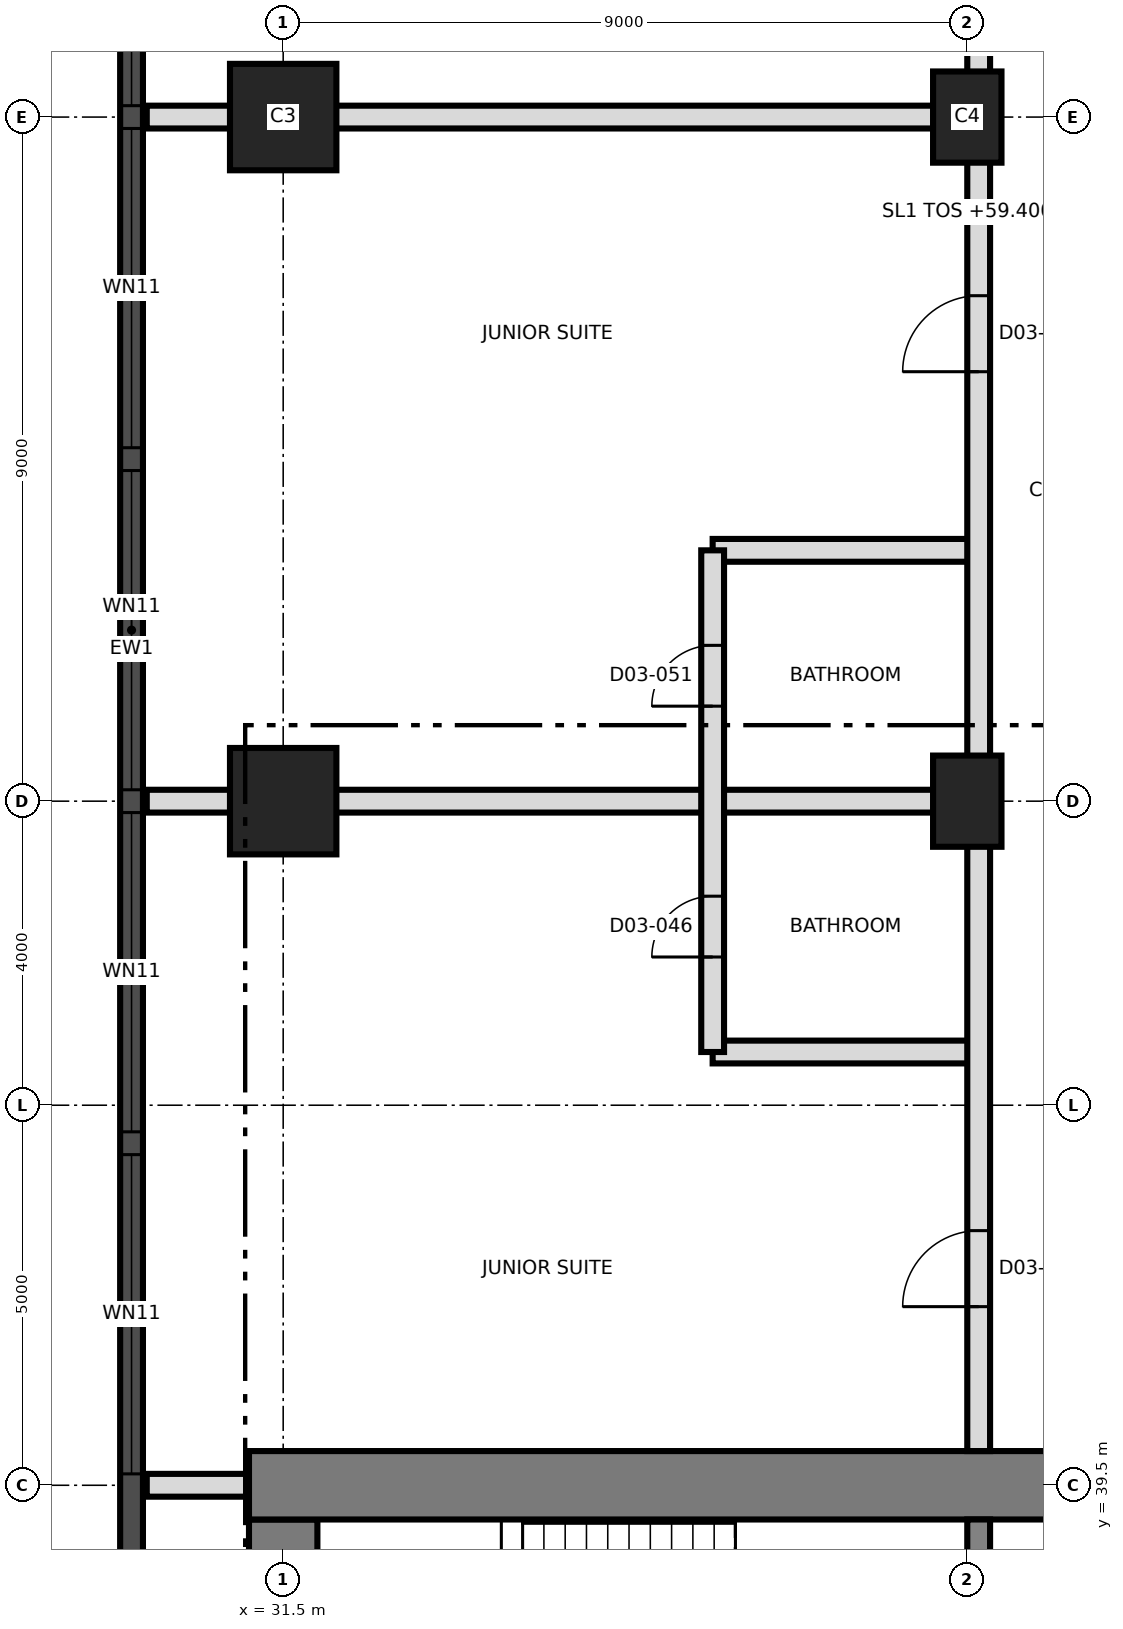
"""IFC4 building model, lengths in metres.
Left out: names, types, materials, properties, quantities, classifications, styles, units other than length and angle.
Written with IfcOpenShell. Run it as: python <this file> out.ifc"""

import sys

from ifc_helpers import new_model, si_unit, direction, frame, frame_2d, origin, origin_2d, place, context, subcontext, project, spatial, rectangle, extrude, element, fill, save


model = new_model("IFC4")
c1 = context("Model", 3, precision=1e-05, world=origin(), true_north=direction((0.0, 1.0)))
c2 = subcontext(c1, "Body", "Model", "MODEL_VIEW")
j1 = project(units=[si_unit("LENGTHUNIT", "METRE"), si_unit("PLANEANGLEUNIT", "RADIAN")], contexts=[c1])
p1 = place(None, origin())
s1 = spatial("IfcSite", under=j1, at=p1, CompositionType="ELEMENT")
p2 = place(p1, origin())
s2 = spatial("IfcBuilding", under=s1, at=p2, CompositionType="ELEMENT")
p3 = place(p2, frame((0.0, 0.0, 59.4)))
s3 = spatial("IfcBuildingStorey", under=s2, at=p3, CompositionType="ELEMENT", Elevation=59.4)
p4 = place(p3, frame((31.5, 21.95, 0.0), z_axis=(0.0, 0.0, 1.0), x_axis=(0.0, 1.0, 0.0)))
e1 = element("IfcWall", 1, at=p4, inside=s3, PredefinedType="SHEAR", context=c2, shape_type="SweptSolid", body=[
    extrude(rectangle(XDim=17.1, YDim=0.9, at=frame_2d((8.55, 0.0))), origin(), (0.0, 0.0, 1.0), 3.7),
])
p5 = place(p3, frame((31.05, 39.5, 0.0), z_axis=(0.0, 0.0, 1.0), x_axis=(1.0, 0.0, 0.0)))
e2 = element("IfcWall", 2, at=p5, inside=s3, PredefinedType="SHEAR", context=c2, shape_type="SweptSolid", body=[
    extrude(rectangle(XDim=27.0, YDim=0.9, at=frame_2d((13.5, 0.0))), origin(), (0.0, 0.0, 1.0), 3.7),
])
p6 = place(p5, frame((10.65, 0.0, 0.0)))
e3 = element("IfcOpeningElement", 3, at=p6, cuts=e2, PredefinedType="OPENING", context=c2, shape_type="SweptSolid", body=[
    extrude(rectangle(XDim=1.2, YDim=2.1, at=frame_2d((0.6, 1.05))), frame((0.0, 0.46, 0.0), z_axis=(0.0, -1.0, 0.0), x_axis=(1.0, 0.0, 0.0)), (0.0, 0.0, 1.0), 0.92),
])
p7 = place(p3, frame((40.65, 33.5, 0.0), z_axis=(0.0, 0.0, 1.0), x_axis=(0.0, 1.0, 0.0)))
e4 = element("IfcWall", 4, at=p7, inside=s3, PredefinedType="SHEAR", context=c2, shape_type="SweptSolid", body=[
    extrude(rectangle(XDim=5.55, YDim=0.3, at=frame_2d((2.775, 0.0))), origin(), (0.0, 0.0, 1.0), 3.7),
])
p8 = place(p3, frame((31.5, 48.5, 0.0), z_axis=(0.0, 0.0, 1.0), x_axis=(1.0, 0.0, 0.0)))
e5 = element("IfcColumn", 5, at=p8, inside=s3, PredefinedType="COLUMN", context=c2, shape_type="SweptSolid", body=[
    extrude(rectangle(XDim=1.4, YDim=1.4, at=origin_2d()), origin(), (0.0, 0.0, 1.0), 3.7),
])
p9 = place(p3, frame((40.5, 48.5, 0.0), z_axis=(0.0, 0.0, 1.0), x_axis=(0.0, 1.0, 0.0)))
e6 = element("IfcColumn", 6, at=p9, inside=s3, PredefinedType="COLUMN", context=c2, shape_type="SweptSolid", body=[
    extrude(rectangle(XDim=1.2, YDim=0.9, at=origin_2d()), origin(), (0.0, 0.0, 1.0), 3.7),
])
p10 = place(p3, frame((31.5, 57.5, 0.0), z_axis=(0.0, 0.0, 1.0), x_axis=(1.0, 0.0, 0.0)))
e7 = element("IfcColumn", 7, at=p10, inside=s3, PredefinedType="COLUMN", context=c2, shape_type="SweptSolid", body=[
    extrude(rectangle(XDim=1.4, YDim=1.4, at=origin_2d()), origin(), (0.0, 0.0, 1.0), 3.7),
])
p11 = place(p3, frame((40.5, 57.5, 0.0), z_axis=(0.0, 0.0, 1.0), x_axis=(0.0, 1.0, 0.0)))
e8 = element("IfcColumn", 8, at=p11, inside=s3, PredefinedType="COLUMN", context=c2, shape_type="SweptSolid", body=[
    extrude(rectangle(XDim=1.2, YDim=0.9, at=origin_2d()), origin(), (0.0, 0.0, 1.0), 3.7),
])
p12 = place(p3, frame((29.505, 66.986, 0.0), z_axis=(0.0, 0.0, 1.0), x_axis=(0.0, -1.0, 0.0)))
e9 = element("IfcWall", 9, at=p12, inside=s3, PredefinedType="SOLIDWALL", context=c2, shape_type="SweptSolid", body=[
    extrude(rectangle(XDim=32.976, YDim=0.3, at=frame_2d((16.488, 0.0))), origin(), (0.0, 0.0, 1.0), 3.4),
])
p13 = place(p12, frame((1.593, 0.0, 0.3)))
e10 = element("IfcOpeningElement", 10, at=p13, cuts=e9, PredefinedType="OPENING", context=c2, shape_type="SweptSolid", body=[
    extrude(rectangle(XDim=1.8, YDim=2.4, at=frame_2d((0.9, 1.2))), frame((0.0, 0.16, 0.0), z_axis=(0.0, -1.0, 0.0), x_axis=(1.0, 0.0, 0.0)), (0.0, 0.0, 1.0), 0.32),
])
p14 = place(p12, frame((5.136, 0.0, 0.9)))
e11 = element("IfcOpeningElement", 11, at=p14, cuts=e9, PredefinedType="OPENING", context=c2, shape_type="SweptSolid", body=[
    extrude(rectangle(XDim=4.2, YDim=1.5, at=frame_2d((2.1, 0.75))), frame((0.0, 0.16, 0.0), z_axis=(0.0, -1.0, 0.0), x_axis=(1.0, 0.0, 0.0)), (0.0, 0.0, 1.0), 0.32),
])
p15 = place(p12, frame((9.636, 0.0, 0.9)))
e12 = element("IfcOpeningElement", 12, at=p15, cuts=e9, PredefinedType="OPENING", context=c2, shape_type="SweptSolid", body=[
    extrude(rectangle(XDim=4.2, YDim=1.5, at=frame_2d((2.1, 0.75))), frame((0.0, 0.16, 0.0), z_axis=(0.0, -1.0, 0.0), x_axis=(1.0, 0.0, 0.0)), (0.0, 0.0, 1.0), 0.32),
])
p16 = place(p12, frame((14.136, 0.0, 0.9)))
e13 = element("IfcOpeningElement", 13, at=p16, cuts=e9, PredefinedType="OPENING", context=c2, shape_type="SweptSolid", body=[
    extrude(rectangle(XDim=4.2, YDim=1.5, at=frame_2d((2.1, 0.75))), frame((0.0, 0.16, 0.0), z_axis=(0.0, -1.0, 0.0), x_axis=(1.0, 0.0, 0.0)), (0.0, 0.0, 1.0), 0.32),
])
p17 = place(p12, frame((18.636, 0.0, 0.9)))
e14 = element("IfcOpeningElement", 14, at=p17, cuts=e9, PredefinedType="OPENING", context=c2, shape_type="SweptSolid", body=[
    extrude(rectangle(XDim=4.2, YDim=1.5, at=frame_2d((2.1, 0.75))), frame((0.0, 0.16, 0.0), z_axis=(0.0, -1.0, 0.0), x_axis=(1.0, 0.0, 0.0)), (0.0, 0.0, 1.0), 0.32),
])
p18 = place(p12, frame((23.136, 0.0, 0.9)))
e15 = element("IfcOpeningElement", 15, at=p18, cuts=e9, PredefinedType="OPENING", context=c2, shape_type="SweptSolid", body=[
    extrude(rectangle(XDim=4.2, YDim=1.5, at=frame_2d((2.1, 0.75))), frame((0.0, 0.16, 0.0), z_axis=(0.0, -1.0, 0.0), x_axis=(1.0, 0.0, 0.0)), (0.0, 0.0, 1.0), 0.32),
])
p19 = place(p12, frame((29.331, 0.0, 0.3)))
e16 = element("IfcOpeningElement", 16, at=p19, cuts=e9, PredefinedType="OPENING", context=c2, shape_type="SweptSolid", body=[
    extrude(rectangle(XDim=1.8, YDim=2.4, at=frame_2d((0.9, 1.2))), frame((0.0, 0.16, 0.0), z_axis=(0.0, -1.0, 0.0), x_axis=(1.0, 0.0, 0.0)), (0.0, 0.0, 1.0), 0.32),
])
p20 = place(p3, frame((29.705, 39.5, 0.0), z_axis=(0.0, 0.0, 1.0), x_axis=(1.0, 0.0, 0.0)))
e17 = element("IfcWall", 17, at=p20, inside=s3, PredefinedType="PARTITIONING", context=c2, shape_type="SweptSolid", body=[
    extrude(rectangle(XDim=1.325, YDim=0.3, at=frame_2d((0.663, 0.0))), origin(), (0.0, 0.0, 1.0), 3.4),
])
p21 = place(p3, frame((37.15, 45.2, 0.0), z_axis=(0.0, 0.0, 1.0), x_axis=(1.0, 0.0, 0.0)))
e18 = element("IfcWall", 18, at=p21, inside=s3, PredefinedType="PARTITIONING", context=c2, shape_type="SweptSolid", body=[
    extrude(rectangle(XDim=3.5, YDim=0.3, at=frame_2d((1.75, 0.0))), origin(), (0.0, 0.0, 1.0), 3.4),
])
p22 = place(p3, frame((29.705, 48.5, 0.0), z_axis=(0.0, 0.0, 1.0), x_axis=(1.0, 0.0, 0.0)))
e19 = element("IfcWall", 19, at=p22, inside=s3, PredefinedType="PARTITIONING", context=c2, shape_type="SweptSolid", body=[
    extrude(rectangle(XDim=10.945, YDim=0.3, at=frame_2d((5.472, 0.0))), origin(), (0.0, 0.0, 1.0), 3.4),
])
p23 = place(p3, frame((37.15, 51.8, 0.0), z_axis=(0.0, 0.0, 1.0), x_axis=(1.0, 0.0, 0.0)))
e20 = element("IfcWall", 20, at=p23, inside=s3, PredefinedType="PARTITIONING", context=c2, shape_type="SweptSolid", body=[
    extrude(rectangle(XDim=3.5, YDim=0.3, at=frame_2d((1.75, 0.0))), origin(), (0.0, 0.0, 1.0), 3.4),
])
p24 = place(p3, frame((29.705, 57.5, 0.0), z_axis=(0.0, 0.0, 1.0), x_axis=(1.0, 0.0, 0.0)))
e21 = element("IfcWall", 21, at=p24, inside=s3, PredefinedType="PARTITIONING", context=c2, shape_type="SweptSolid", body=[
    extrude(rectangle(XDim=10.945, YDim=0.3, at=frame_2d((5.472, 0.0))), origin(), (0.0, 0.0, 1.0), 3.4),
])
p25 = place(p3, frame((37.15, 45.2, 0.0), z_axis=(0.0, 0.0, 1.0), x_axis=(0.0, 1.0, 0.0)))
e22 = element("IfcWall", 22, at=p25, inside=s3, PredefinedType="PARTITIONING", context=c2, shape_type="SweptSolid", body=[
    extrude(rectangle(XDim=6.6, YDim=0.3, at=frame_2d((3.3, 0.0))), origin(), (0.0, 0.0, 1.0), 3.4),
])
p26 = place(p25, frame((1.25, 0.0, 0.0)))
e23 = element("IfcOpeningElement", 23, at=p26, cuts=e22, PredefinedType="OPENING", context=c2, shape_type="SweptSolid", body=[
    extrude(rectangle(XDim=0.8, YDim=2.1, at=frame_2d((0.4, 1.05))), frame((0.0, 0.16, 0.0), z_axis=(0.0, -1.0, 0.0), x_axis=(1.0, 0.0, 0.0)), (0.0, 0.0, 1.0), 0.32),
])
p27 = place(p25, frame((4.55, 0.0, 0.0)))
e24 = element("IfcOpeningElement", 24, at=p27, cuts=e22, PredefinedType="OPENING", context=c2, shape_type="SweptSolid", body=[
    extrude(rectangle(XDim=0.8, YDim=2.1, at=frame_2d((0.4, 1.05))), frame((0.0, 0.16, 0.0), z_axis=(0.0, -1.0, 0.0), x_axis=(1.0, 0.0, 0.0)), (0.0, 0.0, 1.0), 0.32),
])
p28 = place(p3, frame((40.65, 39.95, 0.0), z_axis=(0.0, 0.0, 1.0), x_axis=(0.0, 1.0, 0.0)))
e25 = element("IfcWall", 25, at=p28, inside=s3, PredefinedType="PARTITIONING", context=c2, shape_type="SweptSolid", body=[
    extrude(rectangle(XDim=37.05, YDim=0.3, at=frame_2d((18.525, 0.0))), origin(), (0.0, 0.0, 1.0), 3.4),
])
p29 = place(p28, frame((1.9, 0.0, 0.0)))
e26 = element("IfcOpeningElement", 26, at=p29, cuts=e25, PredefinedType="OPENING", context=c2, shape_type="SweptSolid", body=[
    extrude(rectangle(XDim=1.0, YDim=2.4, at=frame_2d((0.5, 1.2))), frame((0.0, 0.16, 0.0), z_axis=(0.0, -1.0, 0.0), x_axis=(1.0, 0.0, 0.0)), (0.0, 0.0, 1.0), 0.32),
])
p30 = place(p28, frame((14.2, 0.0, 0.0)))
e27 = element("IfcOpeningElement", 27, at=p30, cuts=e25, PredefinedType="OPENING", context=c2, shape_type="SweptSolid", body=[
    extrude(rectangle(XDim=1.0, YDim=2.4, at=frame_2d((0.5, 1.2))), frame((0.0, 0.16, 0.0), z_axis=(0.0, -1.0, 0.0), x_axis=(1.0, 0.0, 0.0)), (0.0, 0.0, 1.0), 0.32),
])
p31 = place(p28, frame((21.05, 0.0, 0.0)))
e28 = element("IfcOpeningElement", 28, at=p31, cuts=e25, PredefinedType="OPENING", context=c2, shape_type="SweptSolid", body=[
    extrude(rectangle(XDim=1.0, YDim=2.4, at=frame_2d((0.5, 1.2))), frame((0.0, 0.16, 0.0), z_axis=(0.0, -1.0, 0.0), x_axis=(1.0, 0.0, 0.0)), (0.0, 0.0, 1.0), 0.32),
])
p32 = place(p14, origin())
e29 = element("IfcWindow", 29, at=p32, inside=s3, PartitioningType="SINGLE_PANEL", PredefinedType="WINDOW", context=c2, shape_type="SweptSolid", body=[
    extrude(rectangle(XDim=4.2, YDim=1.5, at=frame_2d((2.1, 0.75))), frame((0.0, 0.03, 0.0), z_axis=(0.0, -1.0, 0.0), x_axis=(1.0, 0.0, 0.0)), (0.0, 0.0, 1.0), 0.06),
])
fill(e11, e29)
p33 = place(p15, origin())
e30 = element("IfcWindow", 30, at=p33, inside=s3, PartitioningType="SINGLE_PANEL", PredefinedType="WINDOW", context=c2, shape_type="SweptSolid", body=[
    extrude(rectangle(XDim=4.2, YDim=1.5, at=frame_2d((2.1, 0.75))), frame((0.0, 0.03, 0.0), z_axis=(0.0, -1.0, 0.0), x_axis=(1.0, 0.0, 0.0)), (0.0, 0.0, 1.0), 0.06),
])
fill(e12, e30)
p34 = place(p16, origin())
e31 = element("IfcWindow", 31, at=p34, inside=s3, PartitioningType="SINGLE_PANEL", PredefinedType="WINDOW", context=c2, shape_type="SweptSolid", body=[
    extrude(rectangle(XDim=4.2, YDim=1.5, at=frame_2d((2.1, 0.75))), frame((0.0, 0.03, 0.0), z_axis=(0.0, -1.0, 0.0), x_axis=(1.0, 0.0, 0.0)), (0.0, 0.0, 1.0), 0.06),
])
fill(e13, e31)
p35 = place(p17, origin())
e32 = element("IfcWindow", 32, at=p35, inside=s3, PartitioningType="SINGLE_PANEL", PredefinedType="WINDOW", context=c2, shape_type="SweptSolid", body=[
    extrude(rectangle(XDim=4.2, YDim=1.5, at=frame_2d((2.1, 0.75))), frame((0.0, 0.03, 0.0), z_axis=(0.0, -1.0, 0.0), x_axis=(1.0, 0.0, 0.0)), (0.0, 0.0, 1.0), 0.06),
])
fill(e14, e32)
p36 = place(p18, origin())
e33 = element("IfcWindow", 33, at=p36, inside=s3, PartitioningType="SINGLE_PANEL", PredefinedType="WINDOW", context=c2, shape_type="SweptSolid", body=[
    extrude(rectangle(XDim=4.2, YDim=1.5, at=frame_2d((2.1, 0.75))), frame((0.0, 0.03, 0.0), z_axis=(0.0, -1.0, 0.0), x_axis=(1.0, 0.0, 0.0)), (0.0, 0.0, 1.0), 0.06),
])
fill(e15, e33)
p37 = place(p26, origin())
e34 = element("IfcDoor", 34, at=p37, inside=s3, OperationType="SINGLE_SWING_LEFT", PredefinedType="DOOR", context=c2, shape_type="SweptSolid", body=[
    extrude(rectangle(XDim=0.8, YDim=2.1, at=frame_2d((0.4, 1.05))), frame((0.0, 0.025, 0.0), z_axis=(0.0, -1.0, 0.0), x_axis=(1.0, 0.0, 0.0)), (0.0, 0.0, 1.0), 0.05),
])
fill(e23, e34)
p38 = place(p29, origin())
e35 = element("IfcDoor", 35, at=p38, inside=s3, OperationType="SINGLE_SWING_RIGHT", PredefinedType="DOOR", context=c2, shape_type="SweptSolid", body=[
    extrude(rectangle(XDim=1.0, YDim=2.4, at=frame_2d((0.5, 1.2))), frame((0.0, 0.025, 0.0), z_axis=(0.0, -1.0, 0.0), x_axis=(1.0, 0.0, 0.0)), (0.0, 0.0, 1.0), 0.05),
])
fill(e26, e35)
p39 = place(p27, origin())
e36 = element("IfcDoor", 36, at=p39, inside=s3, OperationType="SINGLE_SWING_RIGHT", PredefinedType="DOOR", context=c2, shape_type="SweptSolid", body=[
    extrude(rectangle(XDim=0.8, YDim=2.1, at=frame_2d((0.4, 1.05))), frame((0.0, 0.025, 0.0), z_axis=(0.0, -1.0, 0.0), x_axis=(1.0, 0.0, 0.0)), (0.0, 0.0, 1.0), 0.05),
])
fill(e24, e36)
p40 = place(p30, origin())
e37 = element("IfcDoor", 37, at=p40, inside=s3, OperationType="SINGLE_SWING_LEFT", PredefinedType="DOOR", context=c2, shape_type="SweptSolid", body=[
    extrude(rectangle(XDim=1.0, YDim=2.4, at=frame_2d((0.5, 1.2))), frame((0.0, 0.025, 0.0), z_axis=(0.0, -1.0, 0.0), x_axis=(1.0, 0.0, 0.0)), (0.0, 0.0, 1.0), 0.05),
])
fill(e27, e37)
save(model, sys.argv[1])
